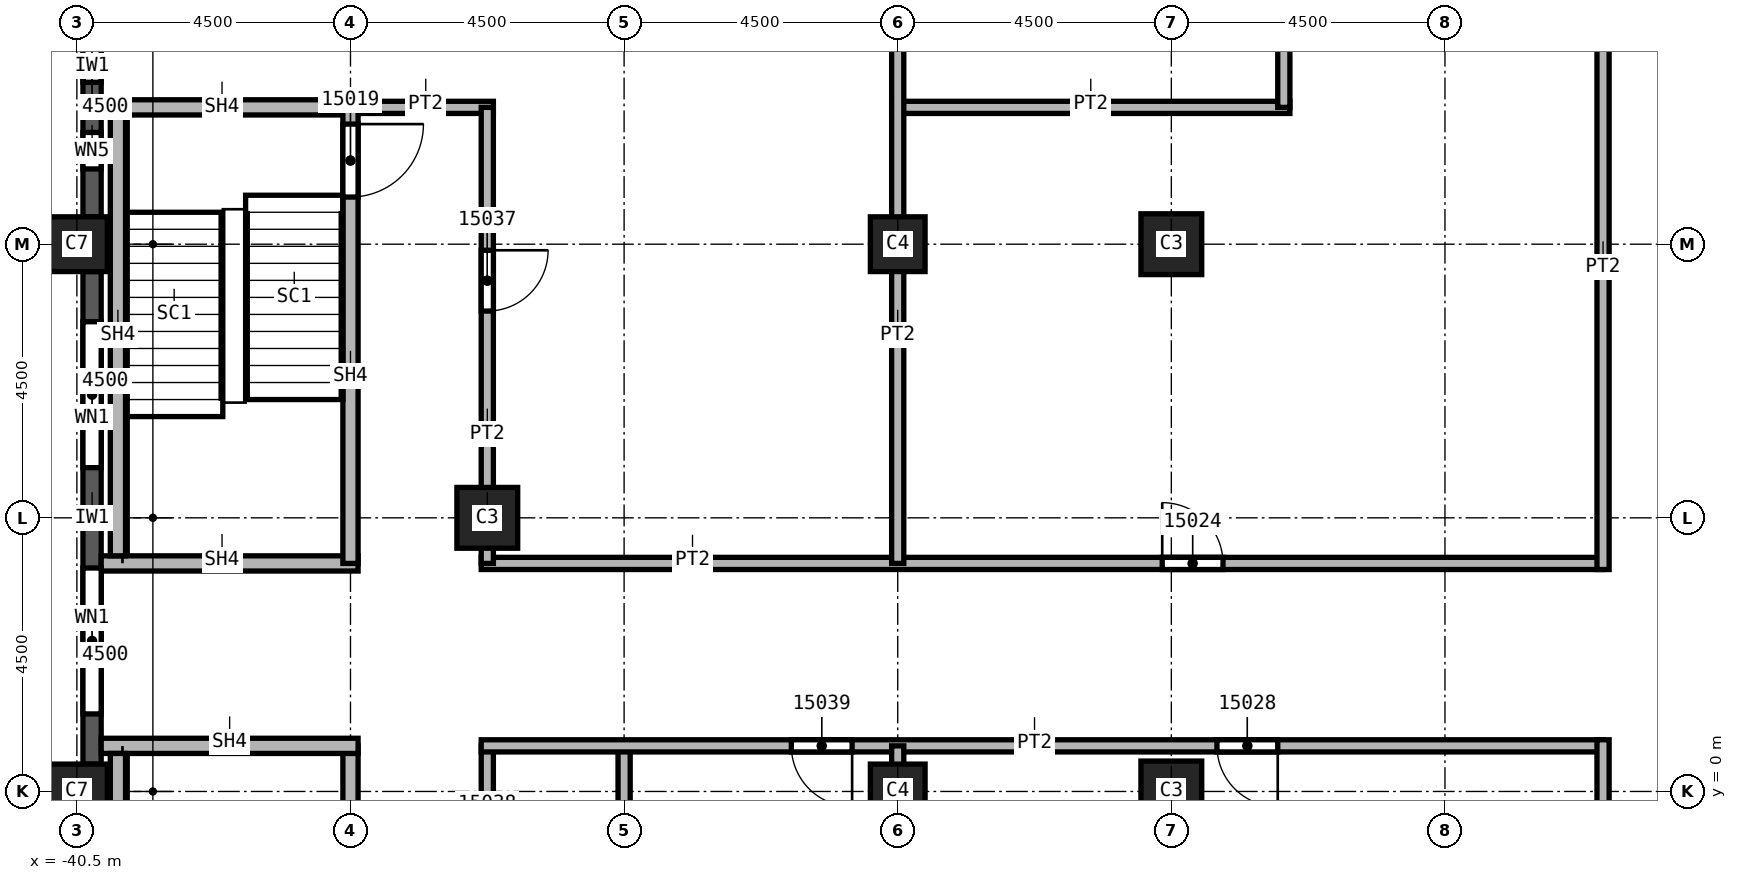
"""IFC4 building model, lengths in metres.
Left out: names, types, materials, properties, quantities, classifications, styles, units other than length and angle.
Written with IfcOpenShell. Run it as: python <this file> out.ifc"""

import sys

from ifc_helpers import new_model, si_unit, direction, frame, frame_2d, origin, origin_2d, place, context, subcontext, project, spatial, rectangle, extrude, element, fill, save


model = new_model("IFC4")
c1 = context("Model", 3, precision=1e-05, world=origin(), true_north=direction((0.0, 1.0)))
c2 = subcontext(c1, "Body", "Model", "MODEL_VIEW")
j1 = project(units=[si_unit("LENGTHUNIT", "METRE"), si_unit("PLANEANGLEUNIT", "RADIAN")], contexts=[c1])
p1 = place(None, origin())
s1 = spatial("IfcSite", under=j1, at=p1, CompositionType="ELEMENT")
p2 = place(p1, origin())
s2 = spatial("IfcBuilding", under=s1, at=p2, CompositionType="ELEMENT")
p3 = place(p2, frame((0.0, 0.0, 232.0)))
s3 = spatial("IfcBuildingStorey", under=s2, at=p3, CompositionType="ELEMENT", Elevation=232.0)
for number, where, z_axis, x_axis in (
    (1, (-40.5, 0.0, 0.0), (0.0, 0.0, 1.0), (0.0, 1.0, 0.0)),
    (2, (-40.5, 9.0, 0.0), (0.0, 0.0, 1.0), (0.0, 1.0, 0.0)),
):
    element("IfcColumn", number, at=place(p3, frame(where, z_axis=z_axis, x_axis=x_axis)), inside=s3, PredefinedType="COLUMN", context=c2, shape_type="SweptSolid", body=[
        extrude(rectangle(XDim=0.9, YDim=1.0, at=origin_2d()), origin(), (0.0, 0.0, 1.0), 3.6),
    ])
for number, where, z_axis, x_axis in (
    (3, (-33.75, 4.5, 0.0), (0.0, 0.0, 1.0), (1.0, 0.0, 0.0)),
    (4, (-22.5, 0.0, 0.0), (0.0, 0.0, 1.0), (1.0, 0.0, 0.0)),
    (5, (-22.5, 9.0, 0.0), (0.0, 0.0, 1.0), (1.0, 0.0, 0.0)),
):
    element("IfcColumn", number, at=place(p3, frame(where, z_axis=z_axis, x_axis=x_axis)), inside=s3, PredefinedType="COLUMN", context=c2, shape_type="SweptSolid", body=[
        extrude(rectangle(XDim=1.0, YDim=1.0, at=origin_2d()), origin(), (0.0, 0.0, 1.0), 3.6),
    ])
for number, where, z_axis, x_axis in (
    (6, (-27.0, 0.0, 0.0), (0.0, 0.0, 1.0), (1.0, 0.0, 0.0)),
    (7, (-27.0, 9.0, 0.0), (0.0, 0.0, 1.0), (1.0, 0.0, 0.0)),
):
    element("IfcColumn", number, at=place(p3, frame(where, z_axis=z_axis, x_axis=x_axis)), inside=s3, PredefinedType="COLUMN", context=c2, shape_type="SweptSolid", body=[
        extrude(rectangle(XDim=0.9, YDim=0.9, at=origin_2d()), origin(), (0.0, 0.0, 1.0), 3.6),
    ])
p4 = place(p3, frame((-40.25, 13.05, 0.0), z_axis=(0.0, 0.0, 1.0), x_axis=(0.0, -1.0, 0.0)))
e8 = element("IfcWall", 8, at=p4, inside=s3, PredefinedType="SOLIDWALL", context=c2, shape_type="SweptSolid", body=[
    extrude(rectangle(XDim=3.6, YDim=0.3, at=frame_2d((1.8, 0.0))), origin(), (0.0, 0.0, 1.0), 3.0),
])
p5 = place(p4, frame((0.788, 0.0, 0.8)))
e9 = element("IfcOpeningElement", 9, at=p5, cuts=e8, PredefinedType="OPENING", context=c2, shape_type="SweptSolid", body=[
    extrude(rectangle(XDim=0.6, YDim=1.95, at=frame_2d((0.3, 0.975))), frame((0.0, 0.15, 0.0), z_axis=(0.0, -1.0, 0.0), x_axis=(1.0, 0.0, 0.0)), (0.0, 0.0, 1.0), 0.3),
])
p6 = place(p4, frame((2.212, 0.0, 0.8)))
e10 = element("IfcOpeningElement", 10, at=p6, cuts=e8, PredefinedType="OPENING", context=c2, shape_type="SweptSolid", body=[
    extrude(rectangle(XDim=0.6, YDim=1.95, at=frame_2d((0.3, 0.975))), frame((0.0, 0.15, 0.0), z_axis=(0.0, -1.0, 0.0), x_axis=(1.0, 0.0, 0.0)), (0.0, 0.0, 1.0), 0.3),
])
p7 = place(p3, frame((-40.25, 8.55, 0.0), z_axis=(0.0, 0.0, 1.0), x_axis=(0.0, -1.0, 0.0)))
e11 = element("IfcWall", 11, at=p7, inside=s3, PredefinedType="SOLIDWALL", context=c2, shape_type="SweptSolid", body=[
    extrude(rectangle(XDim=8.1, YDim=0.3, at=frame_2d((4.05, 0.0))), origin(), (0.0, 0.0, 1.0), 3.0),
])
p8 = place(p7, frame((0.825, 0.0, 0.8)))
e12 = element("IfcOpeningElement", 12, at=p8, cuts=e11, PredefinedType="OPENING", context=c2, shape_type="SweptSolid", body=[
    extrude(rectangle(XDim=2.4, YDim=1.95, at=frame_2d((1.2, 0.975))), frame((0.0, 0.15, 0.0), z_axis=(0.0, -1.0, 0.0), x_axis=(1.0, 0.0, 0.0)), (0.0, 0.0, 1.0), 0.3),
])
p9 = place(p7, frame((4.875, 0.0, 0.8)))
e13 = element("IfcOpeningElement", 13, at=p9, cuts=e11, PredefinedType="OPENING", context=c2, shape_type="SweptSolid", body=[
    extrude(rectangle(XDim=2.4, YDim=1.95, at=frame_2d((1.2, 0.975))), frame((0.0, 0.15, 0.0), z_axis=(0.0, -1.0, 0.0), x_axis=(1.0, 0.0, 0.0)), (0.0, 0.0, 1.0), 0.3),
])
p10 = place(p3, frame((-36.0, 11.25, 0.0), z_axis=(0.0, 0.0, 1.0), x_axis=(1.0, 0.0, 0.0)))
e14 = element("IfcWall", 14, at=p10, inside=s3, PredefinedType="PARTITIONING", context=c2, shape_type="SweptSolid", body=[
    extrude(rectangle(XDim=2.35, YDim=0.2, at=frame_2d((1.175, 0.0))), origin(), (0.0, 0.0, 1.0), 3.6),
])
p11 = place(p3, frame((-33.85, 3.75, 0.0), z_axis=(0.0, 0.0, 1.0), x_axis=(1.0, 0.0, 0.0)))
e15 = element("IfcWall", 15, at=p11, inside=s3, PredefinedType="PARTITIONING", context=c2, shape_type="SweptSolid", body=[
    extrude(rectangle(XDim=18.45, YDim=0.2, at=frame_2d((9.225, 0.0))), origin(), (0.0, 0.0, 1.0), 3.6),
])
p12 = place(p11, frame((11.2, 0.0, 0.0)))
e16 = element("IfcOpeningElement", 16, at=p12, cuts=e15, PredefinedType="OPENING", context=c2, shape_type="SweptSolid", body=[
    extrude(rectangle(XDim=1.0, YDim=2.1, at=frame_2d((0.5, 1.05))), frame((0.0, 0.1, 0.0), z_axis=(0.0, -1.0, 0.0), x_axis=(1.0, 0.0, 0.0)), (0.0, 0.0, 1.0), 0.2),
])
p13 = place(p3, frame((-33.75, 0.75, 0.0), z_axis=(0.0, 0.0, 1.0), x_axis=(0.0, -1.0, 0.0)))
e17 = element("IfcWall", 17, at=p13, inside=s3, PredefinedType="PARTITIONING", context=c2, shape_type="SweptSolid", body=[
    extrude(rectangle(XDim=7.6, YDim=0.2, at=frame_2d((3.8, 0.0))), origin(), (0.0, 0.0, 1.0), 3.6),
])
p14 = place(p13, frame((1.45, 0.0, 0.0)))
e18 = element("IfcOpeningElement", 18, at=p14, cuts=e17, PredefinedType="OPENING", context=c2, shape_type="SweptSolid", body=[
    extrude(rectangle(XDim=1.0, YDim=2.1, at=frame_2d((0.5, 1.05))), frame((0.0, 0.1, 0.0), z_axis=(0.0, -1.0, 0.0), x_axis=(1.0, 0.0, 0.0)), (0.0, 0.0, 1.0), 0.2),
])
p15 = place(p3, frame((-33.75, 11.25, 0.0), z_axis=(0.0, 0.0, 1.0), x_axis=(0.0, -1.0, 0.0)))
e19 = element("IfcWall", 19, at=p15, inside=s3, PredefinedType="PARTITIONING", context=c2, shape_type="SweptSolid", body=[
    extrude(rectangle(XDim=7.5, YDim=0.2, at=frame_2d((3.75, 0.0))), origin(), (0.0, 0.0, 1.0), 3.6),
])
p16 = place(p15, frame((2.35, 0.0, 0.0)))
e20 = element("IfcOpeningElement", 20, at=p16, cuts=e19, PredefinedType="OPENING", context=c2, shape_type="SweptSolid", body=[
    extrude(rectangle(XDim=1.0, YDim=2.1, at=frame_2d((0.5, 1.05))), frame((0.0, 0.1, 0.0), z_axis=(0.0, -1.0, 0.0), x_axis=(1.0, 0.0, 0.0)), (0.0, 0.0, 1.0), 0.2),
])
p17 = place(p3, frame((-31.5, 0.75, 0.0), z_axis=(0.0, 0.0, 1.0), x_axis=(0.0, -1.0, 0.0)))
e21 = element("IfcWall", 21, at=p17, inside=s3, PredefinedType="PARTITIONING", context=c2, shape_type="SweptSolid", body=[
    extrude(rectangle(XDim=18.25, YDim=0.2, at=frame_2d((9.125, 0.0))), origin(), (0.0, 0.0, 1.0), 3.6),
])
p18 = place(p3, frame((-15.4, 0.75, 0.0), z_axis=(0.0, 0.0, 1.0), x_axis=(-1.0, 0.0, 0.0)))
e22 = element("IfcWall", 22, at=p18, inside=s3, PredefinedType="PARTITIONING", context=c2, shape_type="SweptSolid", body=[
    extrude(rectangle(XDim=18.45, YDim=0.2, at=frame_2d((9.225, 0.0))), origin(), (0.0, 0.0, 1.0), 3.6),
])
p19 = place(p18, frame((5.35, 0.0, 0.0)))
e23 = element("IfcOpeningElement", 23, at=p19, cuts=e22, PredefinedType="OPENING", context=c2, shape_type="SweptSolid", body=[
    extrude(rectangle(XDim=1.0, YDim=2.1, at=frame_2d((0.5, 1.05))), frame((0.0, 0.1, 0.0), z_axis=(0.0, -1.0, 0.0), x_axis=(1.0, 0.0, 0.0)), (0.0, 0.0, 1.0), 0.2),
])
p20 = place(p18, frame((12.35, 0.0, 0.0)))
e24 = element("IfcOpeningElement", 24, at=p20, cuts=e22, PredefinedType="OPENING", context=c2, shape_type="SweptSolid", body=[
    extrude(rectangle(XDim=1.0, YDim=2.1, at=frame_2d((0.5, 1.05))), frame((0.0, 0.1, 0.0), z_axis=(0.0, -1.0, 0.0), x_axis=(1.0, 0.0, 0.0)), (0.0, 0.0, 1.0), 0.2),
])
p21 = place(p3, frame((-27.1, 11.25, 0.0), z_axis=(0.0, 0.0, 1.0), x_axis=(1.0, 0.0, 0.0)))
e25 = element("IfcWall", 25, at=p21, inside=s3, PredefinedType="PARTITIONING", context=c2, shape_type="SweptSolid", body=[
    extrude(rectangle(XDim=6.55, YDim=0.2, at=frame_2d((3.275, 0.0))), origin(), (0.0, 0.0, 1.0), 3.6),
])
p22 = place(p3, frame((-27.0, -17.5, 0.0), z_axis=(0.0, 0.0, 1.0), x_axis=(0.0, 1.0, 0.0)))
e26 = element("IfcWall", 26, at=p22, inside=s3, PredefinedType="PARTITIONING", context=c2, shape_type="SweptSolid", body=[
    extrude(rectangle(XDim=18.25, YDim=0.2, at=frame_2d((9.125, 0.0))), origin(), (0.0, 0.0, 1.0), 3.6),
])
p23 = place(p3, frame((-27.0, 3.75, 0.0), z_axis=(0.0, 0.0, 1.0), x_axis=(0.0, 1.0, 0.0)))
e27 = element("IfcWall", 27, at=p23, inside=s3, PredefinedType="PARTITIONING", context=c2, shape_type="SweptSolid", body=[
    extrude(rectangle(XDim=13.75, YDim=0.2, at=frame_2d((6.875, 0.0))), origin(), (0.0, 0.0, 1.0), 3.6),
])
p24 = place(p3, frame((-20.65, 11.25, 0.0), z_axis=(0.0, 0.0, 1.0), x_axis=(0.0, 1.0, 0.0)))
e28 = element("IfcWall", 28, at=p24, inside=s3, PredefinedType="PARTITIONING", context=c2, shape_type="SweptSolid", body=[
    extrude(rectangle(XDim=2.25, YDim=0.2, at=frame_2d((1.125, 0.0))), origin(), (0.0, 0.0, 1.0), 3.6),
])
p25 = place(p3, frame((-15.4, -22.4, 0.0), z_axis=(0.0, 0.0, 1.0), x_axis=(0.0, 1.0, 0.0)))
e29 = element("IfcWall", 29, at=p25, inside=s3, PredefinedType="PARTITIONING", context=c2, shape_type="SweptSolid", body=[
    extrude(rectangle(XDim=23.25, YDim=0.2, at=frame_2d((11.625, 0.0))), origin(), (0.0, 0.0, 1.0), 3.6),
])
p26 = place(p25, frame((0.25, 0.0, 0.0)))
e30 = element("IfcOpeningElement", 30, at=p26, cuts=e29, PredefinedType="OPENING", context=c2, shape_type="SweptSolid", body=[
    extrude(rectangle(XDim=1.0, YDim=2.1, at=frame_2d((0.5, 1.05))), frame((0.0, 0.1, 0.0), z_axis=(0.0, -1.0, 0.0), x_axis=(1.0, 0.0, 0.0)), (0.0, 0.0, 1.0), 0.2),
])
p27 = place(p25, frame((7.7, 0.0, 0.0)))
e31 = element("IfcOpeningElement", 31, at=p27, cuts=e29, PredefinedType="OPENING", context=c2, shape_type="SweptSolid", body=[
    extrude(rectangle(XDim=1.0, YDim=2.1, at=frame_2d((0.5, 1.05))), frame((0.0, 0.1, 0.0), z_axis=(0.0, -1.0, 0.0), x_axis=(1.0, 0.0, 0.0)), (0.0, 0.0, 1.0), 0.2),
])
p28 = place(p25, frame((14.75, 0.0, 0.0)))
e32 = element("IfcOpeningElement", 32, at=p28, cuts=e29, PredefinedType="OPENING", context=c2, shape_type="SweptSolid", body=[
    extrude(rectangle(XDim=1.0, YDim=2.1, at=frame_2d((0.5, 1.05))), frame((0.0, 0.1, 0.0), z_axis=(0.0, -1.0, 0.0), x_axis=(1.0, 0.0, 0.0)), (0.0, 0.0, 1.0), 0.2),
])
p29 = place(p3, frame((-15.4, 3.65, 0.0), z_axis=(0.0, 0.0, 1.0), x_axis=(0.0, 1.0, 0.0)))
e33 = element("IfcWall", 33, at=p29, inside=s3, PredefinedType="PARTITIONING", context=c2, shape_type="SweptSolid", body=[
    extrude(rectangle(XDim=9.95, YDim=0.2, at=frame_2d((4.975, 0.0))), origin(), (0.0, 0.0, 1.0), 3.6),
])
p30 = place(p3, frame((-40.1, 3.75, 0.0), z_axis=(0.0, 0.0, 1.0), x_axis=(1.0, 0.0, 0.0)))
e34 = element("IfcWall", 34, at=p30, inside=s3, PredefinedType="SOLIDWALL", context=c2, shape_type="SweptSolid", body=[
    extrude(rectangle(XDim=4.225, YDim=0.25, at=frame_2d((2.113, 0.0))), origin(), (0.0, 0.0, 1.0), 3.6),
])
p31 = place(p3, frame((-40.1, 11.25, 0.0), z_axis=(0.0, 0.0, 1.0), x_axis=(1.0, 0.0, 0.0)))
e35 = element("IfcWall", 35, at=p31, inside=s3, PredefinedType="SOLIDWALL", context=c2, shape_type="SweptSolid", body=[
    extrude(rectangle(XDim=4.1, YDim=0.25, at=frame_2d((2.05, 0.0))), origin(), (0.0, 0.0, 1.0), 3.6),
])
p32 = place(p3, frame((-36.0, 0.75, 0.0), z_axis=(0.0, 0.0, 1.0), x_axis=(0.0, -1.0, 0.0)))
e36 = element("IfcWall", 36, at=p32, inside=s3, PredefinedType="SOLIDWALL", context=c2, shape_type="SweptSolid", body=[
    extrude(rectangle(XDim=7.625, YDim=0.25, at=frame_2d((3.812, 0.0))), origin(), (0.0, 0.0, 1.0), 3.6),
])
p33 = place(p32, frame((5.95, 0.0, 0.0)))
e37 = element("IfcOpeningElement", 37, at=p33, cuts=e36, PredefinedType="OPENING", context=c2, shape_type="SweptSolid", body=[
    extrude(rectangle(XDim=1.2, YDim=2.1, at=frame_2d((0.6, 1.05))), frame((0.0, 0.125, 0.0), z_axis=(0.0, -1.0, 0.0), x_axis=(1.0, 0.0, 0.0)), (0.0, 0.0, 1.0), 0.25),
])
p34 = place(p3, frame((-36.0, 11.375, 0.0), z_axis=(0.0, 0.0, 1.0), x_axis=(0.0, -1.0, 0.0)))
e38 = element("IfcWall", 38, at=p34, inside=s3, PredefinedType="SOLIDWALL", context=c2, shape_type="SweptSolid", body=[
    extrude(rectangle(XDim=7.625, YDim=0.25, at=frame_2d((3.812, 0.0))), origin(), (0.0, 0.0, 1.0), 3.6),
])
p35 = place(p34, frame((0.4, 0.0, 0.0)))
e39 = element("IfcOpeningElement", 39, at=p35, cuts=e38, PredefinedType="OPENING", context=c2, shape_type="SweptSolid", body=[
    extrude(rectangle(XDim=1.2, YDim=2.1, at=frame_2d((0.6, 1.05))), frame((0.0, 0.125, 0.0), z_axis=(0.0, -1.0, 0.0), x_axis=(1.0, 0.0, 0.0)), (0.0, 0.0, 1.0), 0.25),
])
p36 = place(p3, frame((-35.875, 0.75, 0.0), z_axis=(0.0, 0.0, 1.0), x_axis=(-1.0, 0.0, 0.0)))
e40 = element("IfcWall", 40, at=p36, inside=s3, PredefinedType="SOLIDWALL", context=c2, shape_type="SweptSolid", body=[
    extrude(rectangle(XDim=4.225, YDim=0.25, at=frame_2d((2.113, 0.0))), origin(), (0.0, 0.0, 1.0), 3.6),
])
for number, where, z_axis, x_axis in (
    (41, (-39.825, 3.875, 0.0), (0.0, 0.0, 1.0), (0.0, 1.0, 0.0)),
    (42, (-39.825, -6.625, 0.0), (0.0, 0.0, 1.0), (0.0, 1.0, 0.0)),
):
    element("IfcWall", number, at=place(p3, frame(where, z_axis=z_axis, x_axis=x_axis)), inside=s3, PredefinedType="SOLIDWALL", context=c2, shape_type="SweptSolid", body=[
        extrude(rectangle(XDim=7.25, YDim=0.25, at=frame_2d((3.625, 0.0))), origin(), (0.0, 0.0, 1.0), 3.6),
    ])
p37 = place(p8, origin())
e43 = element("IfcWindow", 43, at=p37, inside=s3, PartitioningType="SINGLE_PANEL", PredefinedType="WINDOW", context=c2, shape_type="SweptSolid", body=[
    extrude(rectangle(XDim=2.4, YDim=1.95, at=frame_2d((1.2, 0.975))), frame((0.0, 0.03, 0.0), z_axis=(0.0, -1.0, 0.0), x_axis=(1.0, 0.0, 0.0)), (0.0, 0.0, 1.0), 0.06),
])
fill(e12, e43)
p38 = place(p9, origin())
e44 = element("IfcWindow", 44, at=p38, inside=s3, PartitioningType="SINGLE_PANEL", PredefinedType="WINDOW", context=c2, shape_type="SweptSolid", body=[
    extrude(rectangle(XDim=2.4, YDim=1.95, at=frame_2d((1.2, 0.975))), frame((0.0, 0.03, 0.0), z_axis=(0.0, -1.0, 0.0), x_axis=(1.0, 0.0, 0.0)), (0.0, 0.0, 1.0), 0.06),
])
fill(e13, e44)
p39 = place(p35, origin())
e45 = element("IfcDoor", 45, at=p39, inside=s3, OperationType="SINGLE_SWING_RIGHT", PredefinedType="DOOR", context=c2, shape_type="SweptSolid", body=[
    extrude(rectangle(XDim=1.2, YDim=2.1, at=frame_2d((0.6, 1.05))), frame((0.0, 0.025, 0.0), z_axis=(0.0, -1.0, 0.0), x_axis=(1.0, 0.0, 0.0)), (0.0, 0.0, 1.0), 0.05),
])
fill(e39, e45)
p40 = place(p12, origin())
e46 = element("IfcDoor", 46, at=p40, inside=s3, OperationType="SINGLE_SWING_LEFT", PredefinedType="DOOR", context=c2, shape_type="SweptSolid", body=[
    extrude(rectangle(XDim=1.0, YDim=2.1, at=frame_2d((0.5, 1.05))), frame((0.0, 0.025, 0.0), z_axis=(0.0, -1.0, 0.0), x_axis=(1.0, 0.0, 0.0)), (0.0, 0.0, 1.0), 0.05),
])
fill(e16, e46)
p41 = place(p19, origin())
e47 = element("IfcDoor", 47, at=p41, inside=s3, OperationType="SINGLE_SWING_LEFT", PredefinedType="DOOR", context=c2, shape_type="SweptSolid", body=[
    extrude(rectangle(XDim=1.0, YDim=2.1, at=frame_2d((0.5, 1.05))), frame((0.0, 0.025, 0.0), z_axis=(0.0, -1.0, 0.0), x_axis=(1.0, 0.0, 0.0)), (0.0, 0.0, 1.0), 0.05),
])
fill(e23, e47)
p42 = place(p16, origin())
e48 = element("IfcDoor", 48, at=p42, inside=s3, OperationType="SINGLE_SWING_RIGHT", PredefinedType="DOOR", context=c2, shape_type="SweptSolid", body=[
    extrude(rectangle(XDim=1.0, YDim=2.1, at=frame_2d((0.5, 1.05))), frame((0.0, 0.025, 0.0), z_axis=(0.0, -1.0, 0.0), x_axis=(1.0, 0.0, 0.0)), (0.0, 0.0, 1.0), 0.05),
])
fill(e20, e48)
p43 = place(p20, origin())
e49 = element("IfcDoor", 49, at=p43, inside=s3, OperationType="SINGLE_SWING_RIGHT", PredefinedType="DOOR", context=c2, shape_type="SweptSolid", body=[
    extrude(rectangle(XDim=1.0, YDim=2.1, at=frame_2d((0.5, 1.05))), frame((0.0, 0.025, 0.0), z_axis=(0.0, -1.0, 0.0), x_axis=(1.0, 0.0, 0.0)), (0.0, 0.0, 1.0), 0.05),
])
fill(e24, e49)
p44 = place(p5, origin())
e50 = element("IfcWindow", 50, at=p44, inside=s3, PartitioningType="SINGLE_PANEL", PredefinedType="WINDOW", context=c2, shape_type="SweptSolid", body=[
    extrude(rectangle(XDim=0.6, YDim=1.95, at=frame_2d((0.3, 0.975))), frame((0.0, 0.03, 0.0), z_axis=(0.0, -1.0, 0.0), x_axis=(1.0, 0.0, 0.0)), (0.0, 0.0, 1.0), 0.06),
])
fill(e9, e50)
p45 = place(p6, origin())
e51 = element("IfcWindow", 51, at=p45, inside=s3, PartitioningType="SINGLE_PANEL", PredefinedType="WINDOW", context=c2, shape_type="SweptSolid", body=[
    extrude(rectangle(XDim=0.6, YDim=1.95, at=frame_2d((0.3, 0.975))), frame((0.0, 0.03, 0.0), z_axis=(0.0, -1.0, 0.0), x_axis=(1.0, 0.0, 0.0)), (0.0, 0.0, 1.0), 0.06),
])
fill(e10, e51)
save(model, sys.argv[1])
